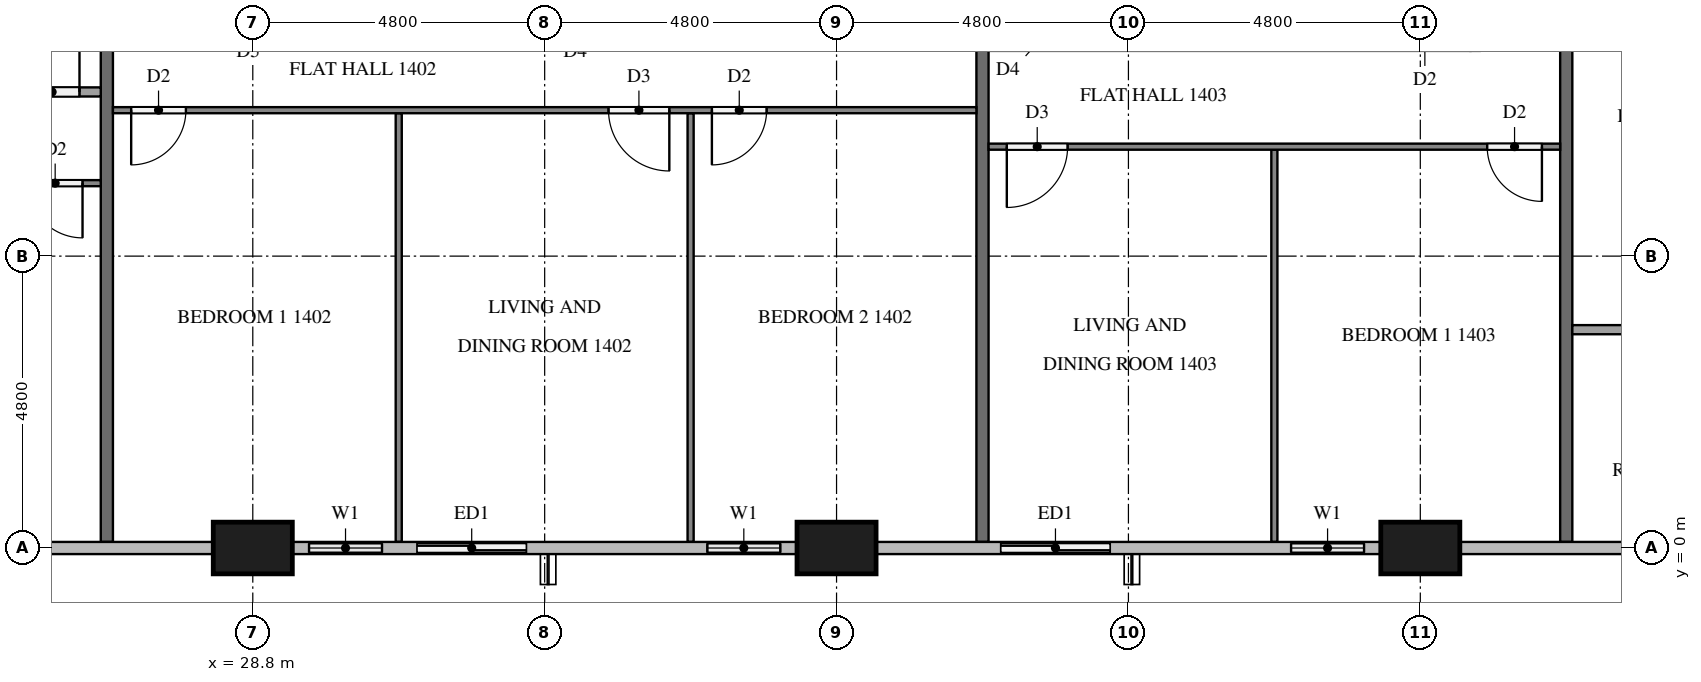
"""IFC4 building model, lengths in metres.
Left out: names, types, materials, properties, quantities, classifications, styles, units other than length and angle.
Written with IfcOpenShell. Run it as: python <this file> out.ifc"""

import sys

from ifc_helpers import new_model, si_unit, direction, frame, frame_2d, origin, origin_2d, place, context, subcontext, project, spatial, rectangle, extrude, element, fill, save


model = new_model("IFC4")
c1 = context("Model", 3, precision=1e-05, world=origin(), true_north=direction((0.0, 1.0)))
c2 = subcontext(c1, "Body", "Model", "MODEL_VIEW")
j1 = project(units=[si_unit("LENGTHUNIT", "METRE"), si_unit("PLANEANGLEUNIT", "RADIAN")], contexts=[c1])
p1 = place(None, origin())
s1 = spatial("IfcSite", under=j1, at=p1, CompositionType="ELEMENT")
p2 = place(p1, origin())
s2 = spatial("IfcBuilding", under=s1, at=p2, CompositionType="ELEMENT")
p3 = place(p2, frame((0.0, 0.0, 59.3)))
s3 = spatial("IfcBuildingStorey", under=s2, at=p3, CompositionType="ELEMENT", Elevation=59.3)
for number, where, z_axis, x_axis in (
    (1, (28.8, 0.0, 0.0), (0.0, 0.0, 1.0), (1.0, 0.0, 0.0)),
    (2, (38.4, 0.0, 0.0), (0.0, 0.0, 1.0), (1.0, 0.0, 0.0)),
    (3, (48.0, 0.0, 0.0), (0.0, 0.0, 1.0), (1.0, 0.0, 0.0)),
):
    element("IfcColumn", number, at=place(p3, frame(where, z_axis=z_axis, x_axis=x_axis)), inside=s3, PredefinedType="COLUMN", context=c2, shape_type="SweptSolid", body=[
        extrude(rectangle(XDim=1.3, YDim=0.85, at=origin_2d()), origin(), (0.0, 0.0, 1.0), 3.2),
    ])
p4 = place(p3, frame((29.45, 0.0, 0.0), z_axis=(0.0, 0.0, 1.0), x_axis=(1.0, 0.0, 0.0)))
e4 = element("IfcWall", 4, at=p4, inside=s3, PredefinedType="SOLIDWALL", context=c2, shape_type="SweptSolid", body=[
    extrude(rectangle(XDim=4.15, YDim=0.15, at=frame_2d((2.075, 0.0))), origin(), (0.0, 0.0, 1.0), 3.2),
])
p5 = place(p4, frame((0.275, 0.0, 0.9)))
e5 = element("IfcOpeningElement", 5, at=p5, cuts=e4, PredefinedType="OPENING", context=c2, shape_type="SweptSolid", body=[
    extrude(rectangle(XDim=1.2, YDim=1.4, at=frame_2d((0.6, 0.7))), frame((0.0, 0.085, 0.0), z_axis=(0.0, -1.0, 0.0), x_axis=(1.0, 0.0, 0.0)), (0.0, 0.0, 1.0), 0.17),
])
p6 = place(p4, frame((2.05, 0.0, 0.0)))
e6 = element("IfcOpeningElement", 6, at=p6, cuts=e4, PredefinedType="OPENING", context=c2, shape_type="SweptSolid", body=[
    extrude(rectangle(XDim=1.8, YDim=2.4, at=frame_2d((0.9, 1.2))), frame((0.0, 0.085, 0.0), z_axis=(0.0, -1.0, 0.0), x_axis=(1.0, 0.0, 0.0)), (0.0, 0.0, 1.0), 0.17),
])
p7 = place(p3, frame((36.0, 0.0, 0.0), z_axis=(0.0, 0.0, 1.0), x_axis=(1.0, 0.0, 0.0)))
e7 = element("IfcWall", 7, at=p7, inside=s3, PredefinedType="SOLIDWALL", context=c2, shape_type="SweptSolid", body=[
    extrude(rectangle(XDim=1.75, YDim=0.15, at=frame_2d((0.875, 0.0))), origin(), (0.0, 0.0, 1.0), 3.2),
])
p8 = place(p7, frame((0.275, 0.0, 0.9)))
e8 = element("IfcOpeningElement", 8, at=p8, cuts=e7, PredefinedType="OPENING", context=c2, shape_type="SweptSolid", body=[
    extrude(rectangle(XDim=1.2, YDim=1.4, at=frame_2d((0.6, 0.7))), frame((0.0, 0.085, 0.0), z_axis=(0.0, -1.0, 0.0), x_axis=(1.0, 0.0, 0.0)), (0.0, 0.0, 1.0), 0.17),
])
p9 = place(p3, frame((40.8, 0.0, 0.0), z_axis=(0.0, 0.0, 1.0), x_axis=(1.0, 0.0, 0.0)))
e9 = element("IfcWall", 9, at=p9, inside=s3, PredefinedType="SOLIDWALL", context=c2, shape_type="SweptSolid", body=[
    extrude(rectangle(XDim=2.4, YDim=0.15, at=frame_2d((1.2, 0.0))), origin(), (0.0, 0.0, 1.0), 3.2),
])
p10 = place(p9, frame((0.3, 0.0, 0.0)))
e10 = element("IfcOpeningElement", 10, at=p10, cuts=e9, PredefinedType="OPENING", context=c2, shape_type="SweptSolid", body=[
    extrude(rectangle(XDim=1.8, YDim=2.4, at=frame_2d((0.9, 1.2))), frame((0.0, 0.085, 0.0), z_axis=(0.0, -1.0, 0.0), x_axis=(1.0, 0.0, 0.0)), (0.0, 0.0, 1.0), 0.17),
])
p11 = place(p3, frame((45.6, 0.0, 0.0), z_axis=(0.0, 0.0, 1.0), x_axis=(1.0, 0.0, 0.0)))
e11 = element("IfcWall", 11, at=p11, inside=s3, PredefinedType="SOLIDWALL", context=c2, shape_type="SweptSolid", body=[
    extrude(rectangle(XDim=1.75, YDim=0.15, at=frame_2d((0.875, 0.0))), origin(), (0.0, 0.0, 1.0), 3.2),
])
p12 = place(p11, frame((0.275, 0.0, 0.9)))
e12 = element("IfcOpeningElement", 12, at=p12, cuts=e11, PredefinedType="OPENING", context=c2, shape_type="SweptSolid", body=[
    extrude(rectangle(XDim=1.2, YDim=1.4, at=frame_2d((0.6, 0.7))), frame((0.0, 0.085, 0.0), z_axis=(0.0, -1.0, 0.0), x_axis=(1.0, 0.0, 0.0)), (0.0, 0.0, 1.0), 0.17),
])
for number, where, z_axis, x_axis in (
    (13, (26.4, 11.9, 0.0), (0.0, 0.0, 1.0), (0.0, -1.0, 0.0)),
    (14, (40.8, 11.9, 0.0), (0.0, 0.0, 1.0), (0.0, -1.0, 0.0)),
    (15, (50.4, 11.9, 0.0), (0.0, 0.0, 1.0), (0.0, -1.0, 0.0)),
):
    element("IfcWall", number, at=place(p3, frame(where, z_axis=z_axis, x_axis=x_axis)), inside=s3, PredefinedType="PARTITIONING", context=c2, shape_type="SweptSolid", body=[
        extrude(rectangle(XDim=11.8, YDim=0.2, at=frame_2d((5.9, 0.0))), origin(), (0.0, 0.0, 1.0), 3.2),
    ])
p13 = place(p3, frame((26.3, 6.0, 0.0), z_axis=(0.0, 0.0, 1.0), x_axis=(-1.0, 0.0, 0.0)))
e16 = element("IfcWall", 16, at=p13, inside=s3, PredefinedType="PARTITIONING", context=c2, shape_type="SweptSolid", body=[
    extrude(rectangle(XDim=14.2, YDim=0.1, at=frame_2d((7.1, 0.0))), origin(), (0.0, 0.0, 1.0), 3.2),
])
p14 = place(p13, frame((9.85, 0.0, 0.0)))
e17 = element("IfcOpeningElement", 17, at=p14, cuts=e16, PredefinedType="OPENING", context=c2, shape_type="SweptSolid", body=[
    extrude(rectangle(XDim=0.9, YDim=2.1, at=frame_2d((0.45, 1.05))), frame((0.0, 0.06, 0.0), z_axis=(0.0, -1.0, 0.0), x_axis=(1.0, 0.0, 0.0)), (0.0, 0.0, 1.0), 0.12),
])
p15 = place(p13, frame((8.15, 0.0, 0.0)))
e18 = element("IfcOpeningElement", 18, at=p15, cuts=e16, PredefinedType="OPENING", context=c2, shape_type="SweptSolid", body=[
    extrude(rectangle(XDim=1.0, YDim=2.1, at=frame_2d((0.5, 1.05))), frame((0.0, 0.06, 0.0), z_axis=(0.0, -1.0, 0.0), x_axis=(1.0, 0.0, 0.0)), (0.0, 0.0, 1.0), 0.12),
])
p16 = place(p13, frame((0.3, 0.0, 0.0)))
e19 = element("IfcOpeningElement", 19, at=p16, cuts=e16, PredefinedType="OPENING", context=c2, shape_type="SweptSolid", body=[
    extrude(rectangle(XDim=0.9, YDim=2.1, at=frame_2d((0.45, 1.05))), frame((0.0, 0.06, 0.0), z_axis=(0.0, -1.0, 0.0), x_axis=(1.0, 0.0, 0.0)), (0.0, 0.0, 1.0), 0.12),
])
p17 = place(p3, frame((13.575, 7.5, 0.0), z_axis=(0.0, 0.0, 1.0), x_axis=(1.0, 0.0, 0.0)))
e20 = element("IfcWall", 20, at=p17, inside=s3, PredefinedType="PARTITIONING", context=c2, shape_type="SweptSolid", body=[
    extrude(rectangle(XDim=12.725, YDim=0.15, at=frame_2d((6.363, 0.0))), origin(), (0.0, 0.0, 1.0), 3.2),
])
p18 = place(p17, frame((2.69, 0.0, 0.0)))
e21 = element("IfcOpeningElement", 21, at=p18, cuts=e20, PredefinedType="OPENING", context=c2, shape_type="SweptSolid", body=[
    extrude(rectangle(XDim=0.9, YDim=2.1, at=frame_2d((0.45, 1.05))), frame((0.0, 0.085, 0.0), z_axis=(0.0, -1.0, 0.0), x_axis=(1.0, 0.0, 0.0)), (0.0, 0.0, 1.0), 0.17),
])
p19 = place(p17, frame((4.24, 0.0, 0.0)))
e22 = element("IfcOpeningElement", 22, at=p19, cuts=e20, PredefinedType="OPENING", context=c2, shape_type="SweptSolid", body=[
    extrude(rectangle(XDim=0.8, YDim=2.1, at=frame_2d((0.4, 1.05))), frame((0.0, 0.085, 0.0), z_axis=(0.0, -1.0, 0.0), x_axis=(1.0, 0.0, 0.0)), (0.0, 0.0, 1.0), 0.17),
])
p20 = place(p17, frame((11.475, 0.0, 0.0)))
e23 = element("IfcOpeningElement", 23, at=p20, cuts=e20, PredefinedType="OPENING", context=c2, shape_type="SweptSolid", body=[
    extrude(rectangle(XDim=0.9, YDim=2.1, at=frame_2d((0.45, 1.05))), frame((0.0, 0.085, 0.0), z_axis=(0.0, -1.0, 0.0), x_axis=(1.0, 0.0, 0.0)), (0.0, 0.0, 1.0), 0.17),
])
for number, where, z_axis, x_axis in (
    (24, (31.2, 7.15, 0.0), (0.0, 0.0, 1.0), (0.0, -1.0, 0.0)),
    (25, (36.0, 7.15, 0.0), (0.0, 0.0, 1.0), (0.0, -1.0, 0.0)),
):
    element("IfcWall", number, at=place(p3, frame(where, z_axis=z_axis, x_axis=x_axis)), inside=s3, PredefinedType="PARTITIONING", context=c2, shape_type="SweptSolid", body=[
        extrude(rectangle(XDim=7.05, YDim=0.1, at=frame_2d((3.525, 0.0))), origin(), (0.0, 0.0, 1.0), 3.2),
    ])
p21 = place(p3, frame((40.7, 7.2, 0.0), z_axis=(0.0, 0.0, 1.0), x_axis=(-1.0, 0.0, 0.0)))
e26 = element("IfcWall", 26, at=p21, inside=s3, PredefinedType="PARTITIONING", context=c2, shape_type="SweptSolid", body=[
    extrude(rectangle(XDim=14.2, YDim=0.1, at=frame_2d((7.1, 0.0))), origin(), (0.0, 0.0, 1.0), 3.2),
])
p22 = place(p21, frame((13.0, 0.0, 0.0)))
e27 = element("IfcOpeningElement", 27, at=p22, cuts=e26, PredefinedType="OPENING", context=c2, shape_type="SweptSolid", body=[
    extrude(rectangle(XDim=0.9, YDim=2.1, at=frame_2d((0.45, 1.05))), frame((0.0, 0.06, 0.0), z_axis=(0.0, -1.0, 0.0), x_axis=(1.0, 0.0, 0.0)), (0.0, 0.0, 1.0), 0.12),
])
p23 = place(p21, frame((5.05, 0.0, 0.0)))
e28 = element("IfcOpeningElement", 28, at=p23, cuts=e26, PredefinedType="OPENING", context=c2, shape_type="SweptSolid", body=[
    extrude(rectangle(XDim=1.0, YDim=2.1, at=frame_2d((0.5, 1.05))), frame((0.0, 0.06, 0.0), z_axis=(0.0, -1.0, 0.0), x_axis=(1.0, 0.0, 0.0)), (0.0, 0.0, 1.0), 0.12),
])
p24 = place(p21, frame((3.45, 0.0, 0.0)))
e29 = element("IfcOpeningElement", 29, at=p24, cuts=e26, PredefinedType="OPENING", context=c2, shape_type="SweptSolid", body=[
    extrude(rectangle(XDim=0.9, YDim=2.1, at=frame_2d((0.45, 1.05))), frame((0.0, 0.06, 0.0), z_axis=(0.0, -1.0, 0.0), x_axis=(1.0, 0.0, 0.0)), (0.0, 0.0, 1.0), 0.12),
])
p25 = place(p3, frame((45.6, 6.55, 0.0), z_axis=(0.0, 0.0, 1.0), x_axis=(0.0, -1.0, 0.0)))
e30 = element("IfcWall", 30, at=p25, inside=s3, PredefinedType="PARTITIONING", context=c2, shape_type="SweptSolid", body=[
    extrude(rectangle(XDim=6.45, YDim=0.1, at=frame_2d((3.225, 0.0))), origin(), (0.0, 0.0, 1.0), 3.2),
])
p26 = place(p3, frame((50.3, 6.6, 0.0), z_axis=(0.0, 0.0, 1.0), x_axis=(-1.0, 0.0, 0.0)))
e31 = element("IfcWall", 31, at=p26, inside=s3, PredefinedType="PARTITIONING", context=c2, shape_type="SweptSolid", body=[
    extrude(rectangle(XDim=9.4, YDim=0.1, at=frame_2d((4.7, 0.0))), origin(), (0.0, 0.0, 1.0), 3.2),
])
p27 = place(p26, frame((0.3, 0.0, 0.0)))
e32 = element("IfcOpeningElement", 32, at=p27, cuts=e31, PredefinedType="OPENING", context=c2, shape_type="SweptSolid", body=[
    extrude(rectangle(XDim=0.9, YDim=2.1, at=frame_2d((0.45, 1.05))), frame((0.0, 0.06, 0.0), z_axis=(0.0, -1.0, 0.0), x_axis=(1.0, 0.0, 0.0)), (0.0, 0.0, 1.0), 0.12),
])
p28 = place(p26, frame((8.1, 0.0, 0.0)))
e33 = element("IfcOpeningElement", 33, at=p28, cuts=e31, PredefinedType="OPENING", context=c2, shape_type="SweptSolid", body=[
    extrude(rectangle(XDim=1.0, YDim=2.1, at=frame_2d((0.5, 1.05))), frame((0.0, 0.06, 0.0), z_axis=(0.0, -1.0, 0.0), x_axis=(1.0, 0.0, 0.0)), (0.0, 0.0, 1.0), 0.12),
])
p29 = place(p3, frame((50.5, 3.59, 0.0), z_axis=(0.0, 0.0, 1.0), x_axis=(1.0, 0.0, 0.0)))
e34 = element("IfcWall", 34, at=p29, inside=s3, PredefinedType="PARTITIONING", context=c2, shape_type="SweptSolid", body=[
    extrude(rectangle(XDim=3.575, YDim=0.15, at=frame_2d((1.788, 0.0))), origin(), (0.0, 0.0, 1.0), 3.2),
])
p30 = place(p5, origin())
e35 = element("IfcWindow", 35, at=p30, inside=s3, PartitioningType="SINGLE_PANEL", PredefinedType="WINDOW", context=c2, shape_type="SweptSolid", body=[
    extrude(rectangle(XDim=1.2, YDim=1.4, at=frame_2d((0.6, 0.7))), frame((0.0, 0.03, 0.0), z_axis=(0.0, -1.0, 0.0), x_axis=(1.0, 0.0, 0.0)), (0.0, 0.0, 1.0), 0.06),
])
fill(e5, e35)
p31 = place(p6, origin())
e36 = element("IfcDoor", 36, at=p31, inside=s3, OperationType="SLIDING_TO_LEFT", PredefinedType="DOOR", context=c2, shape_type="SweptSolid", body=[
    extrude(rectangle(XDim=1.8, YDim=2.4, at=frame_2d((0.9, 1.2))), frame((0.0, 0.025, 0.0), z_axis=(0.0, -1.0, 0.0), x_axis=(1.0, 0.0, 0.0)), (0.0, 0.0, 1.0), 0.05),
])
fill(e6, e36)
p32 = place(p8, origin())
e37 = element("IfcWindow", 37, at=p32, inside=s3, PartitioningType="SINGLE_PANEL", PredefinedType="WINDOW", context=c2, shape_type="SweptSolid", body=[
    extrude(rectangle(XDim=1.2, YDim=1.4, at=frame_2d((0.6, 0.7))), frame((0.0, 0.03, 0.0), z_axis=(0.0, -1.0, 0.0), x_axis=(1.0, 0.0, 0.0)), (0.0, 0.0, 1.0), 0.06),
])
fill(e8, e37)
p33 = place(p10, origin())
e38 = element("IfcDoor", 38, at=p33, inside=s3, OperationType="SLIDING_TO_RIGHT", PredefinedType="DOOR", context=c2, shape_type="SweptSolid", body=[
    extrude(rectangle(XDim=1.8, YDim=2.4, at=frame_2d((0.9, 1.2))), frame((0.0, 0.025, 0.0), z_axis=(0.0, -1.0, 0.0), x_axis=(1.0, 0.0, 0.0)), (0.0, 0.0, 1.0), 0.05),
])
fill(e10, e38)
p34 = place(p12, origin())
e39 = element("IfcWindow", 39, at=p34, inside=s3, PartitioningType="SINGLE_PANEL", PredefinedType="WINDOW", context=c2, shape_type="SweptSolid", body=[
    extrude(rectangle(XDim=1.2, YDim=1.4, at=frame_2d((0.6, 0.7))), frame((0.0, 0.03, 0.0), z_axis=(0.0, -1.0, 0.0), x_axis=(1.0, 0.0, 0.0)), (0.0, 0.0, 1.0), 0.06),
])
fill(e12, e39)
p35 = place(p16, origin())
e40 = element("IfcDoor", 40, at=p35, inside=s3, OperationType="SINGLE_SWING_LEFT", PredefinedType="DOOR", context=c2, shape_type="SweptSolid", body=[
    extrude(rectangle(XDim=0.9, YDim=2.1, at=frame_2d((0.45, 1.05))), frame((0.0, 0.025, 0.0), z_axis=(0.0, -1.0, 0.0), x_axis=(1.0, 0.0, 0.0)), (0.0, 0.0, 1.0), 0.05),
])
fill(e19, e40)
p36 = place(p20, origin())
e41 = element("IfcDoor", 41, at=p36, inside=s3, OperationType="SINGLE_SWING_RIGHT", PredefinedType="DOOR", context=c2, shape_type="SweptSolid", body=[
    extrude(rectangle(XDim=0.9, YDim=2.1, at=frame_2d((0.45, 1.05))), frame((0.0, 0.025, 0.0), z_axis=(0.0, -1.0, 0.0), x_axis=(1.0, 0.0, 0.0)), (0.0, 0.0, 1.0), 0.05),
])
fill(e23, e41)
p37 = place(p22, origin())
e42 = element("IfcDoor", 42, at=p37, inside=s3, OperationType="SINGLE_SWING_RIGHT", PredefinedType="DOOR", context=c2, shape_type="SweptSolid", body=[
    extrude(rectangle(XDim=0.9, YDim=2.1, at=frame_2d((0.45, 1.05))), frame((0.0, 0.025, 0.0), z_axis=(0.0, -1.0, 0.0), x_axis=(1.0, 0.0, 0.0)), (0.0, 0.0, 1.0), 0.05),
])
fill(e27, e42)
p38 = place(p23, origin())
e43 = element("IfcDoor", 43, at=p38, inside=s3, OperationType="SINGLE_SWING_LEFT", PredefinedType="DOOR", context=c2, shape_type="SweptSolid", body=[
    extrude(rectangle(XDim=1.0, YDim=2.1, at=frame_2d((0.5, 1.05))), frame((0.0, 0.025, 0.0), z_axis=(0.0, -1.0, 0.0), x_axis=(1.0, 0.0, 0.0)), (0.0, 0.0, 1.0), 0.05),
])
fill(e28, e43)
p39 = place(p24, origin())
e44 = element("IfcDoor", 44, at=p39, inside=s3, OperationType="SINGLE_SWING_RIGHT", PredefinedType="DOOR", context=c2, shape_type="SweptSolid", body=[
    extrude(rectangle(XDim=0.9, YDim=2.1, at=frame_2d((0.45, 1.05))), frame((0.0, 0.025, 0.0), z_axis=(0.0, -1.0, 0.0), x_axis=(1.0, 0.0, 0.0)), (0.0, 0.0, 1.0), 0.05),
])
fill(e29, e44)
p40 = place(p27, origin())
e45 = element("IfcDoor", 45, at=p40, inside=s3, OperationType="SINGLE_SWING_LEFT", PredefinedType="DOOR", context=c2, shape_type="SweptSolid", body=[
    extrude(rectangle(XDim=0.9, YDim=2.1, at=frame_2d((0.45, 1.05))), frame((0.0, 0.025, 0.0), z_axis=(0.0, -1.0, 0.0), x_axis=(1.0, 0.0, 0.0)), (0.0, 0.0, 1.0), 0.05),
])
fill(e32, e45)
p41 = place(p28, origin())
e46 = element("IfcDoor", 46, at=p41, inside=s3, OperationType="SINGLE_SWING_RIGHT", PredefinedType="DOOR", context=c2, shape_type="SweptSolid", body=[
    extrude(rectangle(XDim=1.0, YDim=2.1, at=frame_2d((0.5, 1.05))), frame((0.0, 0.025, 0.0), z_axis=(0.0, -1.0, 0.0), x_axis=(1.0, 0.0, 0.0)), (0.0, 0.0, 1.0), 0.05),
])
fill(e33, e46)
save(model, sys.argv[1])
